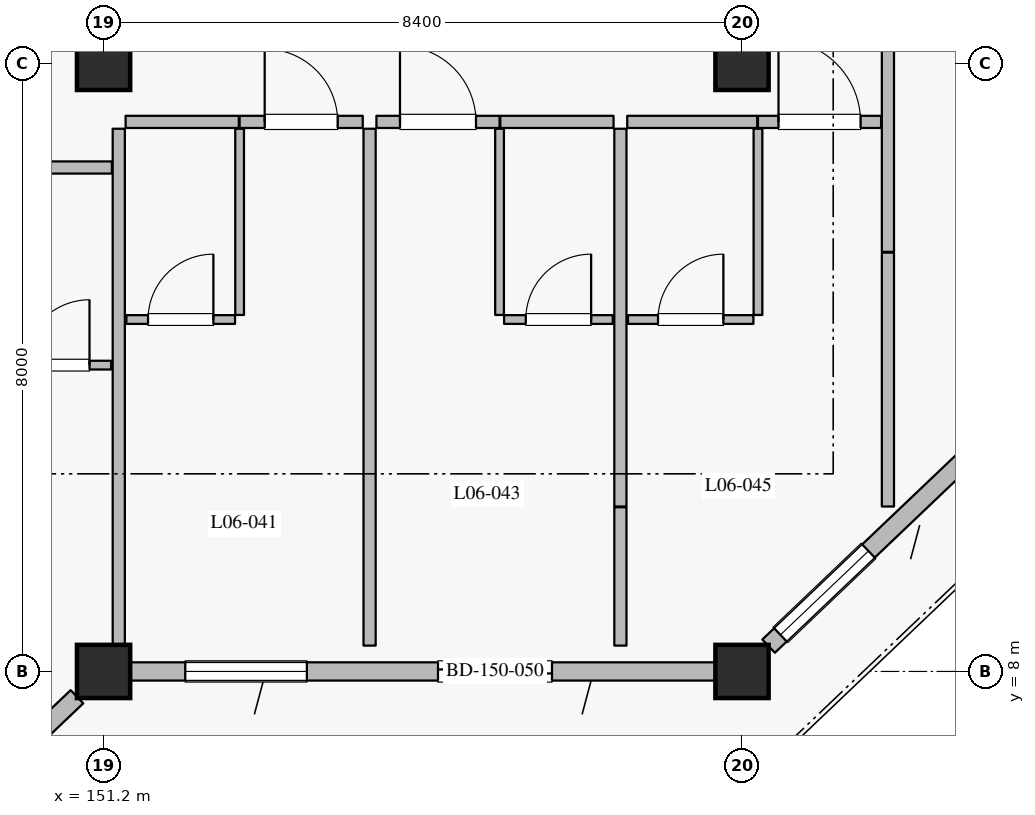
"""IFC4 building model, lengths in metres.
Left out: names, types, materials, properties, quantities, classifications, styles, units other than length and angle.
Written with IfcOpenShell. Run it as: python <this file> out.ifc"""

import sys

from ifc_helpers import new_model, si_unit, direction, frame, frame_2d, origin, origin_2d, place, context, subcontext, project, spatial, rectangle, extrude, element, fill, save


model = new_model("IFC4")
c1 = context("Model", 3, precision=1e-05, world=origin(), true_north=direction((0.0, 1.0)))
c2 = subcontext(c1, "Body", "Model", "MODEL_VIEW")
j1 = project(units=[si_unit("LENGTHUNIT", "METRE"), si_unit("PLANEANGLEUNIT", "RADIAN")], contexts=[c1])
p1 = place(None, origin())
s1 = spatial("IfcSite", under=j1, at=p1, CompositionType="ELEMENT")
p2 = place(p1, origin())
s2 = spatial("IfcBuilding", under=s1, at=p2, CompositionType="ELEMENT")
p3 = place(p2, frame((0.0, 0.0, 28.8)))
s3 = spatial("IfcBuildingStorey", under=s2, at=p3, CompositionType="ELEMENT", Elevation=28.8)
for number, where, z_axis, x_axis in (
    (1, (151.2, 8.0, 0.0), (0.0, 0.0, 1.0), (1.0, 0.0, 0.0)),
    (2, (159.6, 8.0, 0.0), (0.0, 0.0, 1.0), (1.0, 0.0, 0.0)),
    (3, (151.2, 16.0, 0.0), (0.0, 0.0, 1.0), (1.0, 0.0, 0.0)),
    (4, (159.6, 16.0, 0.0), (0.0, 0.0, 1.0), (1.0, 0.0, 0.0)),
):
    element("IfcColumn", number, at=place(p3, frame(where, z_axis=z_axis, x_axis=x_axis)), inside=s3, PredefinedType="COLUMN", context=c2, shape_type="SweptSolid", body=[
        extrude(rectangle(XDim=0.7, YDim=0.7, at=origin_2d()), origin(), (0.0, 0.0, 1.0), 3.6),
    ])
p4 = place(p3, frame((150.85, 7.667, 0.0), z_axis=(0.0, 0.0, 1.0), x_axis=(-0.724116091282, -0.689678103427, 0.0)))
e5 = element("IfcWall", 5, at=p4, inside=s3, PredefinedType="SOLIDWALL", context=c2, shape_type="SweptSolid", body=[
    extrude(rectangle(XDim=10.634, YDim=0.24, at=frame_2d((5.317, 0.0))), origin(), (0.0, 0.0, 1.0), 2.93),
])
p5 = place(p4, frame((1.08, 0.0, 0.0)))
e6 = element("IfcOpeningElement", 6, at=p5, cuts=e5, PredefinedType="OPENING", context=c2, shape_type="SweptSolid", body=[
    extrude(rectangle(XDim=1.5, YDim=2.25, at=frame_2d((0.75, 1.125))), frame((0.0, 0.13, 0.0), z_axis=(0.0, -1.0, 0.0), x_axis=(1.0, 0.0, 0.0)), (0.0, 0.0, 1.0), 0.26),
])
p6 = place(p4, frame((5.276, 0.0, 0.8)))
e7 = element("IfcOpeningElement", 7, at=p6, cuts=e5, PredefinedType="OPENING", context=c2, shape_type="SweptSolid", body=[
    extrude(rectangle(XDim=1.6, YDim=1.6, at=frame_2d((0.8, 0.8))), frame((0.0, 0.13, 0.0), z_axis=(0.0, -1.0, 0.0), x_axis=(1.0, 0.0, 0.0)), (0.0, 0.0, 1.0), 0.26),
])
p7 = place(p4, frame((8.764, 0.0, 0.8)))
e8 = element("IfcOpeningElement", 8, at=p7, cuts=e5, PredefinedType="OPENING", context=c2, shape_type="SweptSolid", body=[
    extrude(rectangle(XDim=1.6, YDim=1.6, at=frame_2d((0.8, 0.8))), frame((0.0, 0.13, 0.0), z_axis=(0.0, -1.0, 0.0), x_axis=(1.0, 0.0, 0.0)), (0.0, 0.0, 1.0), 0.26),
])
p8 = place(p3, frame((159.25, 8.0, 0.0), z_axis=(0.0, 0.0, 1.0), x_axis=(-1.0, 0.0, 0.0)))
e9 = element("IfcWall", 9, at=p8, inside=s3, PredefinedType="SOLIDWALL", context=c2, shape_type="SweptSolid", body=[
    extrude(rectangle(XDim=7.7, YDim=0.24, at=frame_2d((3.85, 0.0))), origin(), (0.0, 0.0, 1.0), 2.93),
])
p9 = place(p8, frame((2.15, 0.0, 0.0)))
e10 = element("IfcOpeningElement", 10, at=p9, cuts=e9, PredefinedType="OPENING", context=c2, shape_type="SweptSolid", body=[
    extrude(rectangle(XDim=1.5, YDim=2.25, at=frame_2d((0.75, 1.125))), frame((0.0, 0.13, 0.0), z_axis=(0.0, -1.0, 0.0), x_axis=(1.0, 0.0, 0.0)), (0.0, 0.0, 1.0), 0.26),
])
p10 = place(p8, frame((5.375, 0.0, 0.8)))
e11 = element("IfcOpeningElement", 11, at=p10, cuts=e9, PredefinedType="OPENING", context=c2, shape_type="SweptSolid", body=[
    extrude(rectangle(XDim=1.6, YDim=1.6, at=frame_2d((0.8, 0.8))), frame((0.0, 0.13, 0.0), z_axis=(0.0, -1.0, 0.0), x_axis=(1.0, 0.0, 0.0)), (0.0, 0.0, 1.0), 0.26),
])
p11 = place(p3, frame((167.65, 15.667, 0.0), z_axis=(0.0, 0.0, 1.0), x_axis=(-0.724105170588, -0.689689569247, 0.0)))
e12 = element("IfcWall", 12, at=p11, inside=s3, PredefinedType="SOLIDWALL", context=c2, shape_type="SweptSolid", body=[
    extrude(rectangle(XDim=10.634, YDim=0.24, at=frame_2d((5.317, 0.0))), origin(), (0.0, 0.0, 1.0), 2.93),
])
p12 = place(p11, frame((0.983, 0.0, 0.0)))
e13 = element("IfcOpeningElement", 13, at=p12, cuts=e12, PredefinedType="OPENING", context=c2, shape_type="SweptSolid", body=[
    extrude(rectangle(XDim=1.5, YDim=2.25, at=frame_2d((0.75, 1.125))), frame((0.0, 0.13, 0.0), z_axis=(0.0, -1.0, 0.0), x_axis=(1.0, 0.0, 0.0)), (0.0, 0.0, 1.0), 0.26),
])
p13 = place(p11, frame((5.035, 0.0, 0.8)))
e14 = element("IfcOpeningElement", 14, at=p13, cuts=e12, PredefinedType="OPENING", context=c2, shape_type="SweptSolid", body=[
    extrude(rectangle(XDim=2.0, YDim=1.75, at=frame_2d((1.0, 0.875))), frame((0.0, 0.13, 0.0), z_axis=(0.0, -1.0, 0.0), x_axis=(1.0, 0.0, 0.0)), (0.0, 0.0, 1.0), 0.26),
])
p14 = place(p11, frame((8.819, 0.0, 0.8)))
e15 = element("IfcOpeningElement", 15, at=p14, cuts=e12, PredefinedType="OPENING", context=c2, shape_type="SweptSolid", body=[
    extrude(rectangle(XDim=1.6, YDim=1.6, at=frame_2d((0.8, 0.8))), frame((0.0, 0.13, 0.0), z_axis=(0.0, -1.0, 0.0), x_axis=(1.0, 0.0, 0.0)), (0.0, 0.0, 1.0), 0.26),
])
p15 = place(p3, frame((149.82, 14.63, 0.0), z_axis=(0.0, 0.0, 1.0), x_axis=(1.0, 0.0, 0.0)))
e16 = element("IfcWall", 16, at=p15, inside=s3, PredefinedType="PARTITIONING", context=c2, shape_type="SweptSolid", body=[
    extrude(rectangle(XDim=1.49, YDim=0.16, at=frame_2d((0.745, 0.0))), origin(), (0.0, 0.0, 1.0), 3.365),
])
p16 = place(p3, frame((149.87, 12.03, 0.0), z_axis=(0.0, 0.0, 1.0), x_axis=(1.0, 0.0, 0.0)))
e17 = element("IfcWall", 17, at=p16, inside=s3, PredefinedType="PARTITIONING", context=c2, shape_type="SweptSolid", body=[
    extrude(rectangle(XDim=1.43, YDim=0.115, at=frame_2d((0.715, 0.0))), origin(), (0.0, 0.0, 1.0), 3.365),
])
p17 = place(p16, frame((0.285, 0.0, 0.0)))
e18 = element("IfcOpeningElement", 18, at=p17, cuts=e17, PredefinedType="OPENING", context=c2, shape_type="SweptSolid", body=[
    extrude(rectangle(XDim=0.86, YDim=2.12, at=frame_2d((0.43, 1.06))), frame((0.0, 0.067, 0.0), z_axis=(0.0, -1.0, 0.0), x_axis=(1.0, 0.0, 0.0)), (0.0, 0.0, 1.0), 0.135),
])
p18 = place(p3, frame((151.49, 15.23, 0.0), z_axis=(0.0, 0.0, 1.0), x_axis=(1.0, 0.0, 0.0)))
e19 = element("IfcWall", 19, at=p18, inside=s3, PredefinedType="PARTITIONING", context=c2, shape_type="SweptSolid", body=[
    extrude(rectangle(XDim=1.49, YDim=0.16, at=frame_2d((0.745, 0.0))), origin(), (0.0, 0.0, 1.0), 3.365),
])
p19 = place(p3, frame((152.99, 15.23, 0.0), z_axis=(0.0, 0.0, 1.0), x_axis=(1.0, 0.0, 0.0)))
e20 = element("IfcWall", 20, at=p19, inside=s3, PredefinedType="PARTITIONING", context=c2, shape_type="SweptSolid", body=[
    extrude(rectangle(XDim=1.62, YDim=0.16, at=frame_2d((0.81, 0.0))), origin(), (0.0, 0.0, 1.0), 3.365),
])
p20 = place(p19, frame((0.33, 0.0, 0.0)))
e21 = element("IfcOpeningElement", 21, at=p20, cuts=e20, PredefinedType="OPENING", context=c2, shape_type="SweptSolid", body=[
    extrude(rectangle(XDim=0.96, YDim=2.2, at=frame_2d((0.48, 1.1))), frame((0.0, 0.09, 0.0), z_axis=(0.0, -1.0, 0.0), x_axis=(1.0, 0.0, 0.0)), (0.0, 0.0, 1.0), 0.18),
])
p21 = place(p3, frame((152.99, 12.69, 0.0), z_axis=(0.0, 0.0, 1.0), x_axis=(0.0, 1.0, 0.0)))
e22 = element("IfcWall", 22, at=p21, inside=s3, PredefinedType="PARTITIONING", context=c2, shape_type="SweptSolid", body=[
    extrude(rectangle(XDim=2.45, YDim=0.115, at=frame_2d((1.225, 0.0))), origin(), (0.0, 0.0, 1.0), 3.365),
])
p22 = place(p3, frame((151.5, 12.63, 0.0), z_axis=(0.0, 0.0, 1.0), x_axis=(1.0, 0.0, 0.0)))
e23 = element("IfcWall", 23, at=p22, inside=s3, PredefinedType="PARTITIONING", context=c2, shape_type="SweptSolid", body=[
    extrude(rectangle(XDim=1.43, YDim=0.115, at=frame_2d((0.715, 0.0))), origin(), (0.0, 0.0, 1.0), 3.365),
])
p23 = place(p22, frame((0.285, 0.0, 0.0)))
e24 = element("IfcOpeningElement", 24, at=p23, cuts=e23, PredefinedType="OPENING", context=c2, shape_type="SweptSolid", body=[
    extrude(rectangle(XDim=0.86, YDim=2.12, at=frame_2d((0.43, 1.06))), frame((0.0, 0.067, 0.0), z_axis=(0.0, -1.0, 0.0), x_axis=(1.0, 0.0, 0.0)), (0.0, 0.0, 1.0), 0.135),
])
p24 = place(p3, frame((151.4, 8.34, 0.0), z_axis=(0.0, 0.0, 1.0), x_axis=(0.0, 1.0, 0.0)))
e25 = element("IfcWall", 25, at=p24, inside=s3, PredefinedType="PARTITIONING", context=c2, shape_type="SweptSolid", body=[
    extrude(rectangle(XDim=6.8, YDim=0.16, at=frame_2d((3.4, 0.0))), origin(), (0.0, 0.0, 1.0), 2.73),
])
p25 = place(p3, frame((154.79, 15.23, 0.0), z_axis=(0.0, 0.0, 1.0), x_axis=(1.0, 0.0, 0.0)))
e26 = element("IfcWall", 26, at=p25, inside=s3, PredefinedType="PARTITIONING", context=c2, shape_type="SweptSolid", body=[
    extrude(rectangle(XDim=1.62, YDim=0.16, at=frame_2d((0.81, 0.0))), origin(), (0.0, 0.0, 1.0), 3.365),
])
p26 = place(p25, frame((0.31, 0.0, 0.0)))
e27 = element("IfcOpeningElement", 27, at=p26, cuts=e26, PredefinedType="OPENING", context=c2, shape_type="SweptSolid", body=[
    extrude(rectangle(XDim=1.0, YDim=2.25, at=frame_2d((0.5, 1.125))), frame((0.0, 0.09, 0.0), z_axis=(0.0, -1.0, 0.0), x_axis=(1.0, 0.0, 0.0)), (0.0, 0.0, 1.0), 0.18),
])
p27 = place(p3, frame((156.42, 15.23, 0.0), z_axis=(0.0, 0.0, 1.0), x_axis=(1.0, 0.0, 0.0)))
e28 = element("IfcWall", 28, at=p27, inside=s3, PredefinedType="PARTITIONING", context=c2, shape_type="SweptSolid", body=[
    extrude(rectangle(XDim=1.49, YDim=0.16, at=frame_2d((0.745, 0.0))), origin(), (0.0, 0.0, 1.0), 3.365),
])
p28 = place(p3, frame((156.41, 12.69, 0.0), z_axis=(0.0, 0.0, 1.0), x_axis=(0.0, 1.0, 0.0)))
e29 = element("IfcWall", 29, at=p28, inside=s3, PredefinedType="PARTITIONING", context=c2, shape_type="SweptSolid", body=[
    extrude(rectangle(XDim=2.45, YDim=0.115, at=frame_2d((1.225, 0.0))), origin(), (0.0, 0.0, 1.0), 3.365),
])
p29 = place(p3, frame((156.47, 12.63, 0.0), z_axis=(0.0, 0.0, 1.0), x_axis=(1.0, 0.0, 0.0)))
e30 = element("IfcWall", 30, at=p29, inside=s3, PredefinedType="PARTITIONING", context=c2, shape_type="SweptSolid", body=[
    extrude(rectangle(XDim=1.43, YDim=0.115, at=frame_2d((0.715, 0.0))), origin(), (0.0, 0.0, 1.0), 3.365),
])
p30 = place(p29, frame((0.285, 0.0, 0.0)))
e31 = element("IfcOpeningElement", 31, at=p30, cuts=e30, PredefinedType="OPENING", context=c2, shape_type="SweptSolid", body=[
    extrude(rectangle(XDim=0.86, YDim=2.12, at=frame_2d((0.43, 1.06))), frame((0.0, 0.067, 0.0), z_axis=(0.0, -1.0, 0.0), x_axis=(1.0, 0.0, 0.0)), (0.0, 0.0, 1.0), 0.135),
])
p31 = place(p3, frame((154.7, 8.34, 0.0), z_axis=(0.0, 0.0, 1.0), x_axis=(0.0, 1.0, 0.0)))
e32 = element("IfcWall", 32, at=p31, inside=s3, PredefinedType="PARTITIONING", context=c2, shape_type="SweptSolid", body=[
    extrude(rectangle(XDim=6.8, YDim=0.16, at=frame_2d((3.4, 0.0))), origin(), (0.0, 0.0, 1.0), 3.365),
])
p32 = place(p3, frame((158.0, 8.34, 0.0), z_axis=(0.0, 0.0, 1.0), x_axis=(0.0, 1.0, 0.0)))
e33 = element("IfcWall", 33, at=p32, inside=s3, PredefinedType="PARTITIONING", context=c2, shape_type="SweptSolid", body=[
    extrude(rectangle(XDim=1.82, YDim=0.16, at=frame_2d((0.91, 0.0))), origin(), (0.0, 0.0, 1.0), 3.365),
])
p33 = place(p3, frame((158.09, 15.23, 0.0), z_axis=(0.0, 0.0, 1.0), x_axis=(1.0, 0.0, 0.0)))
e34 = element("IfcWall", 34, at=p33, inside=s3, PredefinedType="PARTITIONING", context=c2, shape_type="SweptSolid", body=[
    extrude(rectangle(XDim=1.71, YDim=0.16, at=frame_2d((0.855, 0.0))), origin(), (0.0, 0.0, 1.0), 3.365),
])
p34 = place(p3, frame((159.81, 15.23, 0.0), z_axis=(0.0, 0.0, 1.0), x_axis=(1.0, 0.0, 0.0)))
e35 = element("IfcWall", 35, at=p34, inside=s3, PredefinedType="PARTITIONING", context=c2, shape_type="SweptSolid", body=[
    extrude(rectangle(XDim=1.62, YDim=0.16, at=frame_2d((0.81, 0.0))), origin(), (0.0, 0.0, 1.0), 3.365),
])
p35 = place(p34, frame((0.27, 0.0, 0.0)))
e36 = element("IfcOpeningElement", 36, at=p35, cuts=e35, PredefinedType="OPENING", context=c2, shape_type="SweptSolid", body=[
    extrude(rectangle(XDim=1.08, YDim=2.3, at=frame_2d((0.54, 1.15))), frame((0.0, 0.09, 0.0), z_axis=(0.0, -1.0, 0.0), x_axis=(1.0, 0.0, 0.0)), (0.0, 0.0, 1.0), 0.18),
])
p36 = place(p3, frame((159.81, 12.69, 0.0), z_axis=(0.0, 0.0, 1.0), x_axis=(0.0, 1.0, 0.0)))
e37 = element("IfcWall", 37, at=p36, inside=s3, PredefinedType="PARTITIONING", context=c2, shape_type="SweptSolid", body=[
    extrude(rectangle(XDim=2.45, YDim=0.115, at=frame_2d((1.225, 0.0))), origin(), (0.0, 0.0, 1.0), 2.73),
])
p37 = place(p3, frame((158.1, 12.63, 0.0), z_axis=(0.0, 0.0, 1.0), x_axis=(1.0, 0.0, 0.0)))
e38 = element("IfcWall", 38, at=p37, inside=s3, PredefinedType="PARTITIONING", context=c2, shape_type="SweptSolid", body=[
    extrude(rectangle(XDim=1.65, YDim=0.115, at=frame_2d((0.825, 0.0))), origin(), (0.0, 0.0, 1.0), 3.365),
])
p38 = place(p37, frame((0.395, 0.0, 0.0)))
e39 = element("IfcOpeningElement", 39, at=p38, cuts=e38, PredefinedType="OPENING", context=c2, shape_type="SweptSolid", body=[
    extrude(rectangle(XDim=0.86, YDim=2.12, at=frame_2d((0.43, 1.06))), frame((0.0, 0.067, 0.0), z_axis=(0.0, -1.0, 0.0), x_axis=(1.0, 0.0, 0.0)), (0.0, 0.0, 1.0), 0.135),
])
p39 = place(p3, frame((158.0, 10.17, 0.0), z_axis=(0.0, 0.0, 1.0), x_axis=(0.0, 1.0, 0.0)))
e40 = element("IfcWall", 40, at=p39, inside=s3, PredefinedType="PARTITIONING", context=c2, shape_type="SweptSolid", body=[
    extrude(rectangle(XDim=4.97, YDim=0.16, at=frame_2d((2.485, 0.0))), origin(), (0.0, 0.0, 1.0), 3.365),
])
p40 = place(p3, frame((161.52, 10.17, 0.0), z_axis=(0.0, 0.0, 1.0), x_axis=(0.0, 1.0, 0.0)))
e41 = element("IfcWall", 41, at=p40, inside=s3, PredefinedType="PARTITIONING", context=c2, shape_type="SweptSolid", body=[
    extrude(rectangle(XDim=3.34, YDim=0.16, at=frame_2d((1.67, 0.0))), origin(), (0.0, 0.0, 1.0), 3.365),
])
p41 = place(p3, frame((161.52, 13.52, 0.0), z_axis=(0.0, 0.0, 1.0), x_axis=(0.0, 1.0, 0.0)))
e42 = element("IfcWall", 42, at=p41, inside=s3, PredefinedType="PARTITIONING", context=c2, shape_type="SweptSolid", body=[
    extrude(rectangle(XDim=9.55, YDim=0.16, at=frame_2d((4.775, 0.0))), origin(), (0.0, 0.0, 1.0), 3.365),
])
p42 = place(p9, origin())
e43 = element("IfcDoor", 43, at=p42, inside=s3, OperationType="SLIDING_TO_LEFT", PredefinedType="DOOR", context=c2, shape_type="SweptSolid", body=[
    extrude(rectangle(XDim=1.5, YDim=2.25, at=frame_2d((0.75, 1.125))), frame((0.0, 0.025, 0.0), z_axis=(0.0, -1.0, 0.0), x_axis=(1.0, 0.0, 0.0)), (0.0, 0.0, 1.0), 0.05),
])
fill(e10, e43)
p43 = place(p10, origin())
e44 = element("IfcWindow", 44, at=p43, inside=s3, PartitioningType="SINGLE_PANEL", PredefinedType="WINDOW", context=c2, shape_type="SweptSolid", body=[
    extrude(rectangle(XDim=1.6, YDim=1.6, at=frame_2d((0.8, 0.8))), frame((0.0, 0.03, 0.0), z_axis=(0.0, -1.0, 0.0), x_axis=(1.0, 0.0, 0.0)), (0.0, 0.0, 1.0), 0.06),
])
fill(e11, e44)
p44 = place(p14, origin())
e45 = element("IfcWindow", 45, at=p44, inside=s3, PartitioningType="SINGLE_PANEL", PredefinedType="WINDOW", context=c2, shape_type="SweptSolid", body=[
    extrude(rectangle(XDim=1.6, YDim=1.6, at=frame_2d((0.8, 0.8))), frame((0.0, 0.03, 0.0), z_axis=(0.0, -1.0, 0.0), x_axis=(1.0, 0.0, 0.0)), (0.0, 0.0, 1.0), 0.06),
])
fill(e15, e45)
p45 = place(p17, origin())
e46 = element("IfcDoor", 46, at=p45, inside=s3, OperationType="SINGLE_SWING_RIGHT", PredefinedType="DOOR", context=c2, shape_type="SweptSolid", body=[
    extrude(rectangle(XDim=0.86, YDim=2.12, at=frame_2d((0.43, 1.06))), frame((0.0, 0.025, 0.0), z_axis=(0.0, -1.0, 0.0), x_axis=(1.0, 0.0, 0.0)), (0.0, 0.0, 1.0), 0.05),
])
fill(e18, e46)
p46 = place(p20, origin())
e47 = element("IfcDoor", 47, at=p46, inside=s3, OperationType="SINGLE_SWING_LEFT", PredefinedType="DOOR", context=c2, shape_type="SweptSolid", body=[
    extrude(rectangle(XDim=0.96, YDim=2.2, at=frame_2d((0.48, 1.1))), frame((0.0, 0.025, 0.0), z_axis=(0.0, -1.0, 0.0), x_axis=(1.0, 0.0, 0.0)), (0.0, 0.0, 1.0), 0.05),
])
fill(e21, e47)
p47 = place(p23, origin())
e48 = element("IfcDoor", 48, at=p47, inside=s3, OperationType="SINGLE_SWING_RIGHT", PredefinedType="DOOR", context=c2, shape_type="SweptSolid", body=[
    extrude(rectangle(XDim=0.86, YDim=2.12, at=frame_2d((0.43, 1.06))), frame((0.0, 0.025, 0.0), z_axis=(0.0, -1.0, 0.0), x_axis=(1.0, 0.0, 0.0)), (0.0, 0.0, 1.0), 0.05),
])
fill(e24, e48)
p48 = place(p26, origin())
e49 = element("IfcDoor", 49, at=p48, inside=s3, OperationType="SINGLE_SWING_LEFT", PredefinedType="DOOR", context=c2, shape_type="SweptSolid", body=[
    extrude(rectangle(XDim=1.0, YDim=2.25, at=frame_2d((0.5, 1.125))), frame((0.0, 0.025, 0.0), z_axis=(0.0, -1.0, 0.0), x_axis=(1.0, 0.0, 0.0)), (0.0, 0.0, 1.0), 0.05),
])
fill(e27, e49)
p49 = place(p30, origin())
e50 = element("IfcDoor", 50, at=p49, inside=s3, OperationType="SINGLE_SWING_RIGHT", PredefinedType="DOOR", context=c2, shape_type="SweptSolid", body=[
    extrude(rectangle(XDim=0.86, YDim=2.12, at=frame_2d((0.43, 1.06))), frame((0.0, 0.025, 0.0), z_axis=(0.0, -1.0, 0.0), x_axis=(1.0, 0.0, 0.0)), (0.0, 0.0, 1.0), 0.05),
])
fill(e31, e50)
p50 = place(p35, origin())
e51 = element("IfcDoor", 51, at=p50, inside=s3, OperationType="SINGLE_SWING_LEFT", PredefinedType="DOOR", context=c2, shape_type="SweptSolid", body=[
    extrude(rectangle(XDim=1.08, YDim=2.3, at=frame_2d((0.54, 1.15))), frame((0.0, 0.025, 0.0), z_axis=(0.0, -1.0, 0.0), x_axis=(1.0, 0.0, 0.0)), (0.0, 0.0, 1.0), 0.05),
])
fill(e36, e51)
p51 = place(p38, origin())
e52 = element("IfcDoor", 52, at=p51, inside=s3, OperationType="SINGLE_SWING_RIGHT", PredefinedType="DOOR", context=c2, shape_type="SweptSolid", body=[
    extrude(rectangle(XDim=0.86, YDim=2.12, at=frame_2d((0.43, 1.06))), frame((0.0, 0.025, 0.0), z_axis=(0.0, -1.0, 0.0), x_axis=(1.0, 0.0, 0.0)), (0.0, 0.0, 1.0), 0.05),
])
fill(e39, e52)
save(model, sys.argv[1])
